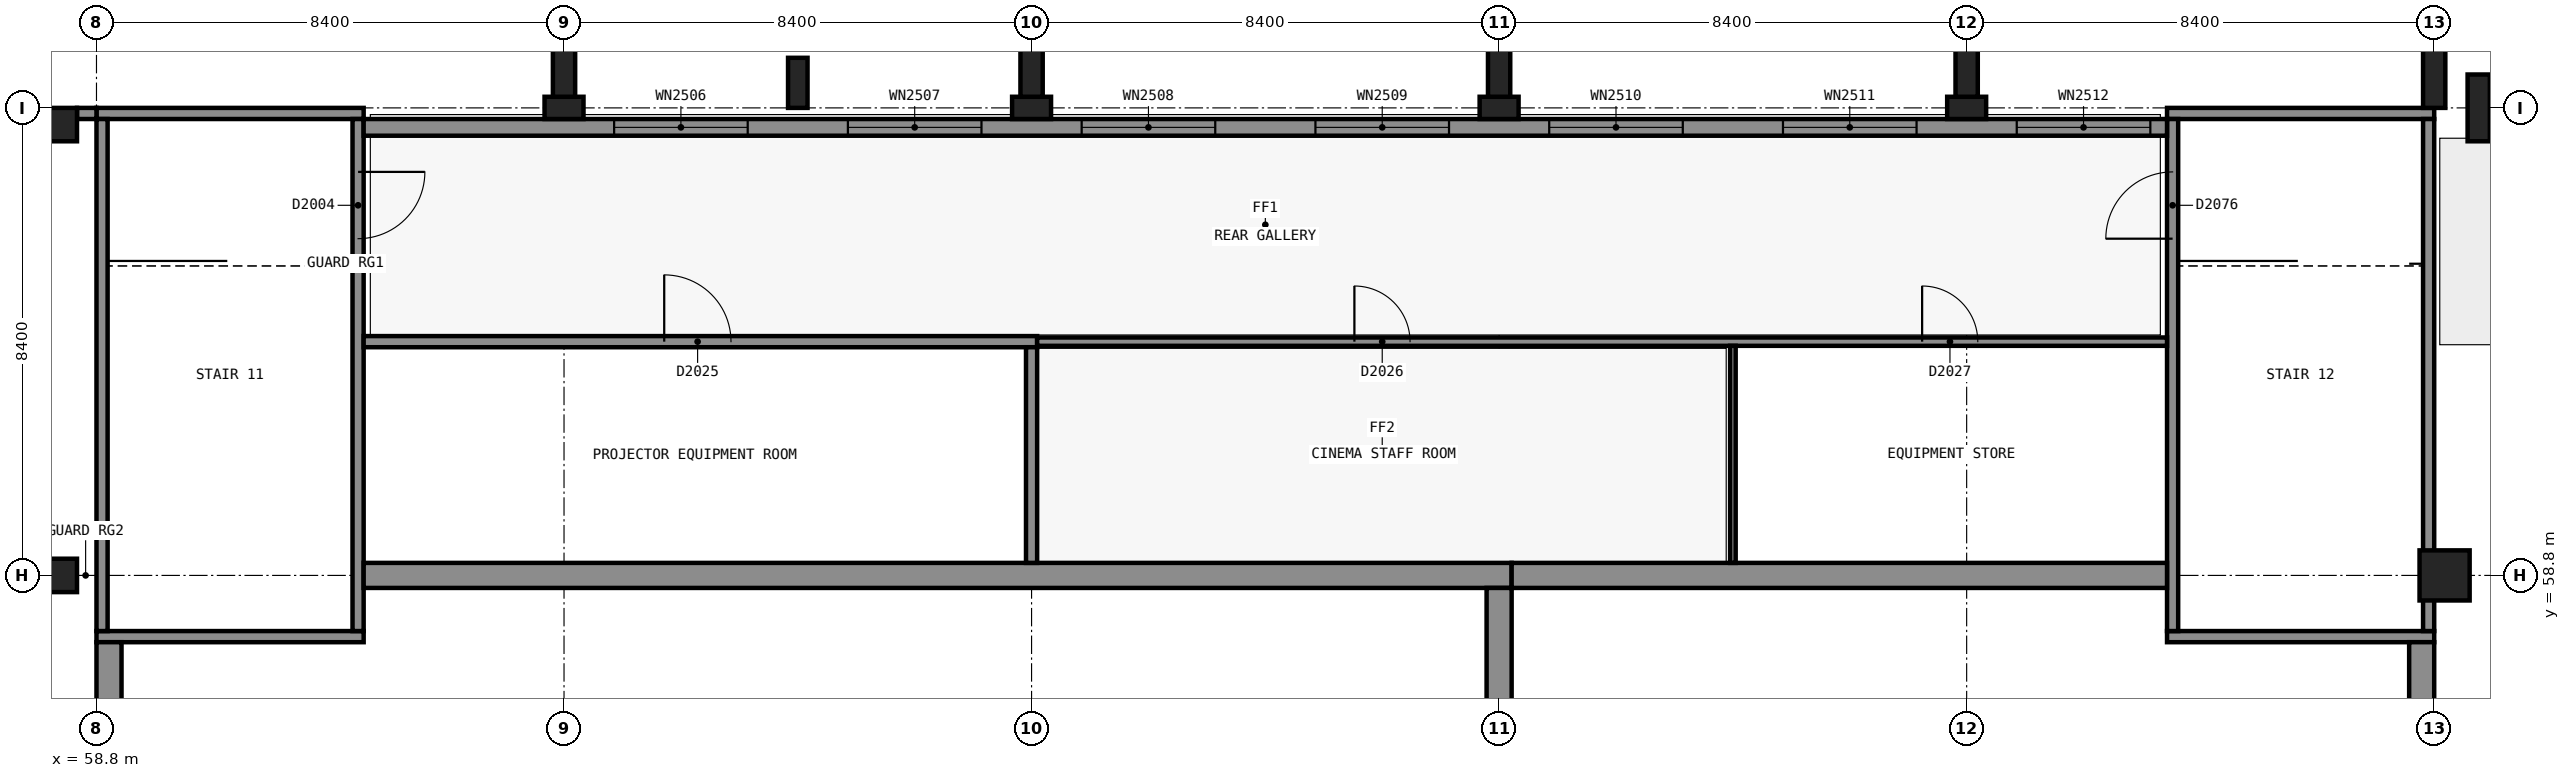
"""IFC4 building model, lengths in metres.
Left out: names, types, materials, properties, quantities, classifications, styles, units other than length and angle.
Written with IfcOpenShell. Run it as: python <this file> out.ifc"""

import sys

from ifc_helpers import new_model, si_unit, direction, frame, frame_2d, origin, origin_2d, place, context, subcontext, project, spatial, rectangle, extrude, element, fill, save


model = new_model("IFC4")
c1 = context("Model", 3, precision=1e-05, world=origin(), true_north=direction((0.0, 1.0)))
c2 = subcontext(c1, "Body", "Model", "MODEL_VIEW")
j1 = project(units=[si_unit("LENGTHUNIT", "METRE"), si_unit("PLANEANGLEUNIT", "RADIAN")], contexts=[c1])
p1 = place(None, origin())
s1 = spatial("IfcSite", under=j1, at=p1, CompositionType="ELEMENT")
p2 = place(p1, origin())
s2 = spatial("IfcBuilding", under=s1, at=p2, CompositionType="ELEMENT")
p3 = place(p2, frame((0.0, 0.0, 10.2)))
s3 = spatial("IfcBuildingStorey", under=s2, at=p3, CompositionType="ELEMENT", Elevation=10.2)
for number, where, z_axis, x_axis in (
    (1, (63.6, 57.7, 0.0), (0.0, 0.0, 1.0), (-1.0, 0.0, 0.0)),
    (2, (58.8, 67.1, 0.0), (0.0, 0.0, 1.0), (1.0, 0.0, 0.0)),
):
    element("IfcWall", number, at=place(p3, frame(where, z_axis=z_axis, x_axis=x_axis)), inside=s3, PredefinedType="SHEAR", context=c2, shape_type="SweptSolid", body=[
        extrude(rectangle(XDim=4.8, YDim=0.2, at=frame_2d((2.4, 0.0))), origin(), (0.0, 0.0, 1.0), 4.8),
    ])
p4 = place(p3, frame((58.9, 57.8, 0.0), z_axis=(0.0, 0.0, 1.0), x_axis=(0.0, 1.0, 0.0)))
e3 = element("IfcWall", 3, at=p4, inside=s3, PredefinedType="SHEAR", context=c2, shape_type="SweptSolid", body=[
    extrude(rectangle(XDim=9.2, YDim=0.2, at=frame_2d((4.6, 0.0))), origin(), (0.0, 0.0, 1.0), 4.8),
])
p5 = place(p3, frame((63.5, 67.0, 0.0), z_axis=(0.0, 0.0, 1.0), x_axis=(0.0, -1.0, 0.0)))
e4 = element("IfcWall", 4, at=p5, inside=s3, PredefinedType="SHEAR", context=c2, shape_type="SweptSolid", body=[
    extrude(rectangle(XDim=9.2, YDim=0.2, at=frame_2d((4.6, 0.0))), origin(), (0.0, 0.0, 1.0), 4.8),
])
p6 = place(p5, frame((0.95, 0.0, 0.0)))
e5 = element("IfcOpeningElement", 5, at=p6, cuts=e4, PredefinedType="OPENING", context=c2, shape_type="SweptSolid", body=[
    extrude(rectangle(XDim=1.2, YDim=2.1, at=frame_2d((0.6, 1.05))), frame((0.0, 0.11, 0.0), z_axis=(0.0, -1.0, 0.0), x_axis=(1.0, 0.0, 0.0)), (0.0, 0.0, 1.0), 0.22),
])
for number, where, z_axis, x_axis in (
    (6, (100.8, 57.7, 0.0), (0.0, 0.0, 1.0), (-1.0, 0.0, 0.0)),
    (7, (96.0, 67.1, 0.0), (0.0, 0.0, 1.0), (1.0, 0.0, 0.0)),
):
    element("IfcWall", number, at=place(p3, frame(where, z_axis=z_axis, x_axis=x_axis)), inside=s3, PredefinedType="SHEAR", context=c2, shape_type="SweptSolid", body=[
        extrude(rectangle(XDim=4.8, YDim=0.2, at=frame_2d((2.4, 0.0))), origin(), (0.0, 0.0, 1.0), 4.8),
    ])
p7 = place(p3, frame((96.1, 57.8, 0.0), z_axis=(0.0, 0.0, 1.0), x_axis=(0.0, 1.0, 0.0)))
e8 = element("IfcWall", 8, at=p7, inside=s3, PredefinedType="SHEAR", context=c2, shape_type="SweptSolid", body=[
    extrude(rectangle(XDim=9.2, YDim=0.2, at=frame_2d((4.6, 0.0))), origin(), (0.0, 0.0, 1.0), 4.8),
])
p8 = place(p7, frame((7.05, 0.0, 0.0)))
e9 = element("IfcOpeningElement", 9, at=p8, cuts=e8, PredefinedType="OPENING", context=c2, shape_type="SweptSolid", body=[
    extrude(rectangle(XDim=1.2, YDim=2.1, at=frame_2d((0.6, 1.05))), frame((0.0, 0.11, 0.0), z_axis=(0.0, -1.0, 0.0), x_axis=(1.0, 0.0, 0.0)), (0.0, 0.0, 1.0), 0.22),
])
p9 = place(p3, frame((100.7, 67.0, 0.0), z_axis=(0.0, 0.0, 1.0), x_axis=(0.0, -1.0, 0.0)))
e10 = element("IfcWall", 10, at=p9, inside=s3, PredefinedType="SHEAR", context=c2, shape_type="SweptSolid", body=[
    extrude(rectangle(XDim=9.2, YDim=0.2, at=frame_2d((4.6, 0.0))), origin(), (0.0, 0.0, 1.0), 4.8),
])
p10 = place(p3, frame((63.6, 58.8, 0.0), z_axis=(0.0, 0.0, 1.0), x_axis=(1.0, 0.0, 0.0)))
e11 = element("IfcWall", 11, at=p10, inside=s3, PredefinedType="SHEAR", context=c2, shape_type="SweptSolid", body=[
    extrude(rectangle(XDim=20.625, YDim=0.45, at=frame_2d((10.312, 0.0))), origin(), (0.0, 0.0, 1.0), 4.8),
])
p11 = place(p3, frame((59.025, 33.825, 0.0), z_axis=(0.0, 0.0, 1.0), x_axis=(0.0, 1.0, 0.0)))
e12 = element("IfcWall", 12, at=p11, inside=s3, PredefinedType="SHEAR", context=c2, shape_type="SweptSolid", body=[
    extrude(rectangle(XDim=23.775, YDim=0.45, at=frame_2d((11.888, 0.0))), origin(), (0.0, 0.0, 1.0), 4.8),
])
p12 = place(p3, frame((84.0, 58.575, 0.0), z_axis=(0.0, 0.0, 1.0), x_axis=(0.0, -1.0, 0.0)))
e13 = element("IfcWall", 13, at=p12, inside=s3, PredefinedType="SHEAR", context=c2, shape_type="SweptSolid", body=[
    extrude(rectangle(XDim=24.75, YDim=0.45, at=frame_2d((12.375, 0.0))), origin(), (0.0, 0.0, 1.0), 4.8),
])
p13 = place(p3, frame((84.225, 58.8, 0.0), z_axis=(0.0, 0.0, 1.0), x_axis=(1.0, 0.0, 0.0)))
e14 = element("IfcWall", 14, at=p13, inside=s3, PredefinedType="SHEAR", context=c2, shape_type="SweptSolid", body=[
    extrude(rectangle(XDim=11.775, YDim=0.45, at=frame_2d((5.887, 0.0))), origin(), (0.0, 0.0, 1.0), 4.8),
])
p14 = place(p3, frame((100.575, 57.6, 0.0), z_axis=(0.0, 0.0, 1.0), x_axis=(0.0, -1.0, 0.0)))
e15 = element("IfcWall", 15, at=p14, inside=s3, PredefinedType="SHEAR", context=c2, shape_type="SweptSolid", body=[
    extrude(rectangle(XDim=22.8, YDim=0.45, at=frame_2d((11.4, 0.0))), origin(), (0.0, 0.0, 1.0), 4.8),
])
for number, where, z_axis, x_axis in (
    (16, (67.2, 67.2, 0.0), (0.0, 0.0, 1.0), (1.0, 0.0, 0.0)),
    (17, (75.6, 67.2, 0.0), (0.0, 0.0, 1.0), (1.0, 0.0, 0.0)),
    (18, (84.0, 67.2, 0.0), (0.0, 0.0, 1.0), (1.0, 0.0, 0.0)),
    (19, (92.4, 67.2, 0.0), (0.0, 0.0, 1.0), (1.0, 0.0, 0.0)),
):
    element("IfcColumn", number, at=place(p3, frame(where, z_axis=z_axis, x_axis=x_axis)), inside=s3, PredefinedType="COLUMN", context=c2, shape_type="SweptSolid", body=[
        extrude(rectangle(XDim=0.7, YDim=0.4, at=origin_2d()), origin(), (0.0, 0.0, 1.0), 4.8),
    ])
for number, where, z_axis, x_axis in (
    (20, (58.15, 58.8, 0.0), (0.0, 0.0, 1.0), (1.0, 0.0, 0.0)),
    (21, (58.15, 66.9, 0.0), (0.0, 0.0, 1.0), (1.0, 0.0, 0.0)),
):
    element("IfcColumn", number, at=place(p3, frame(where, z_axis=z_axis, x_axis=x_axis)), inside=s3, PredefinedType="COLUMN", context=c2, shape_type="SweptSolid", body=[
        extrude(rectangle(XDim=0.6, YDim=0.6, at=origin_2d()), origin(), (0.0, 0.0, 1.0), 4.8),
    ])
p15 = place(p3, frame((100.987, 58.8, 3.8), z_axis=(0.0, 0.0, 1.0), x_axis=(1.0, 0.0, 0.0)))
e22 = element("IfcColumn", 22, at=p15, inside=s3, PredefinedType="COLUMN", context=c2, shape_type="SweptSolid", body=[
    extrude(rectangle(XDim=0.9, YDim=0.9, at=origin_2d()), origin(), (0.0, 0.0, 1.0), 1.0),
])
p16 = place(p3, frame((58.45, 67.1, 0.0), z_axis=(0.0, 0.0, 1.0), x_axis=(1.0, 0.0, 0.0)))
e23 = element("IfcWall", 23, at=p16, inside=s3, PredefinedType="SHEAR", context=c2, shape_type="SweptSolid", body=[
    extrude(rectangle(XDim=0.35, YDim=0.2, at=frame_2d((0.175, 0.0))), origin(), (0.0, 0.0, 1.0), 4.8),
])
p17 = place(p3, frame((101.6, 67.2, 0.0), z_axis=(0.0, 0.0, 1.0), x_axis=(0.0, 1.0, 0.0)))
e24 = element("IfcColumn", 24, at=p17, inside=s3, PredefinedType="PILASTER", context=c2, shape_type="SweptSolid", body=[
    extrude(rectangle(XDim=0.4, YDim=1.2, at=origin_2d()), origin(), (0.0, 0.0, 1.0), 4.8),
])
p18 = place(p3, frame((63.6, 66.85, 0.0), z_axis=(0.0, 0.0, 1.0), x_axis=(1.0, 0.0, 0.0)))
e25 = element("IfcWall", 25, at=p18, inside=s3, PredefinedType="SOLIDWALL", context=c2, shape_type="SweptSolid", body=[
    extrude(rectangle(XDim=32.4, YDim=0.3, at=frame_2d((16.2, 0.0))), origin(), (0.0, 0.0, 1.0), 4.2),
])
p19 = place(p18, frame((4.5, 0.0, 0.9)))
e26 = element("IfcOpeningElement", 26, at=p19, cuts=e25, PredefinedType="OPENING", context=c2, shape_type="SweptSolid", body=[
    extrude(rectangle(XDim=2.4, YDim=1.8, at=frame_2d((1.2, 0.9))), frame((0.0, 0.16, 0.0), z_axis=(0.0, -1.0, 0.0), x_axis=(1.0, 0.0, 0.0)), (0.0, 0.0, 1.0), 0.32),
])
p20 = place(p18, frame((8.7, 0.0, 0.9)))
e27 = element("IfcOpeningElement", 27, at=p20, cuts=e25, PredefinedType="OPENING", context=c2, shape_type="SweptSolid", body=[
    extrude(rectangle(XDim=2.4, YDim=1.8, at=frame_2d((1.2, 0.9))), frame((0.0, 0.16, 0.0), z_axis=(0.0, -1.0, 0.0), x_axis=(1.0, 0.0, 0.0)), (0.0, 0.0, 1.0), 0.32),
])
p21 = place(p18, frame((12.9, 0.0, 0.9)))
e28 = element("IfcOpeningElement", 28, at=p21, cuts=e25, PredefinedType="OPENING", context=c2, shape_type="SweptSolid", body=[
    extrude(rectangle(XDim=2.4, YDim=1.8, at=frame_2d((1.2, 0.9))), frame((0.0, 0.16, 0.0), z_axis=(0.0, -1.0, 0.0), x_axis=(1.0, 0.0, 0.0)), (0.0, 0.0, 1.0), 0.32),
])
p22 = place(p18, frame((17.1, 0.0, 0.9)))
e29 = element("IfcOpeningElement", 29, at=p22, cuts=e25, PredefinedType="OPENING", context=c2, shape_type="SweptSolid", body=[
    extrude(rectangle(XDim=2.4, YDim=1.8, at=frame_2d((1.2, 0.9))), frame((0.0, 0.16, 0.0), z_axis=(0.0, -1.0, 0.0), x_axis=(1.0, 0.0, 0.0)), (0.0, 0.0, 1.0), 0.32),
])
p23 = place(p18, frame((21.3, 0.0, 0.9)))
e30 = element("IfcOpeningElement", 30, at=p23, cuts=e25, PredefinedType="OPENING", context=c2, shape_type="SweptSolid", body=[
    extrude(rectangle(XDim=2.4, YDim=1.8, at=frame_2d((1.2, 0.9))), frame((0.0, 0.16, 0.0), z_axis=(0.0, -1.0, 0.0), x_axis=(1.0, 0.0, 0.0)), (0.0, 0.0, 1.0), 0.32),
])
p24 = place(p18, frame((25.5, 0.0, 0.9)))
e31 = element("IfcOpeningElement", 31, at=p24, cuts=e25, PredefinedType="OPENING", context=c2, shape_type="SweptSolid", body=[
    extrude(rectangle(XDim=2.4, YDim=1.8, at=frame_2d((1.2, 0.9))), frame((0.0, 0.16, 0.0), z_axis=(0.0, -1.0, 0.0), x_axis=(1.0, 0.0, 0.0)), (0.0, 0.0, 1.0), 0.32),
])
p25 = place(p18, frame((29.7, 0.0, 0.9)))
e32 = element("IfcOpeningElement", 32, at=p25, cuts=e25, PredefinedType="OPENING", context=c2, shape_type="SweptSolid", body=[
    extrude(rectangle(XDim=2.4, YDim=1.8, at=frame_2d((1.2, 0.9))), frame((0.0, 0.16, 0.0), z_axis=(0.0, -1.0, 0.0), x_axis=(1.0, 0.0, 0.0)), (0.0, 0.0, 1.0), 0.32),
])
p26 = place(p3, frame((67.2, 68.0, 0.0), z_axis=(0.0, 0.0, 1.0), x_axis=(1.0, 0.0, 0.0)))
e33 = element("IfcColumn", 33, at=p26, inside=s3, PredefinedType="PILASTER", context=c2, shape_type="SweptSolid", body=[
    extrude(rectangle(XDim=0.4, YDim=1.2, at=origin_2d()), origin(), (0.0, 0.0, 1.0), 4.8),
])
p27 = place(p3, frame((71.4, 67.65, 0.0), z_axis=(0.0, 0.0, 1.0), x_axis=(1.0, 0.0, 0.0)))
e34 = element("IfcColumn", 34, at=p27, inside=s3, PredefinedType="PILASTER", context=c2, shape_type="SweptSolid", body=[
    extrude(rectangle(XDim=0.35, YDim=0.9, at=origin_2d()), origin(), (0.0, 0.0, 1.0), 4.8),
])
for number, where, z_axis, x_axis in (
    (35, (75.6, 68.0, 0.0), (0.0, 0.0, 1.0), (1.0, 0.0, 0.0)),
    (36, (84.0, 68.0, 0.0), (0.0, 0.0, 1.0), (1.0, 0.0, 0.0)),
    (37, (92.4, 68.0, 0.0), (0.0, 0.0, 1.0), (1.0, 0.0, 0.0)),
    (38, (100.8, 67.8, 0.0), (0.0, 0.0, 1.0), (1.0, 0.0, 0.0)),
):
    element("IfcColumn", number, at=place(p3, frame(where, z_axis=z_axis, x_axis=x_axis)), inside=s3, PredefinedType="PILASTER", context=c2, shape_type="SweptSolid", body=[
        extrude(rectangle(XDim=0.4, YDim=1.2, at=origin_2d()), origin(), (0.0, 0.0, 1.0), 4.8),
    ])
p28 = place(p3, frame((63.6, 63.0, 0.0), z_axis=(0.0, 0.0, 1.0), x_axis=(1.0, 0.0, 0.0)))
e39 = element("IfcWall", 39, at=p28, inside=s3, PredefinedType="SOLIDWALL", context=c2, shape_type="SweptSolid", body=[
    extrude(rectangle(XDim=12.1, YDim=0.2, at=frame_2d((6.05, 0.0))), origin(), (0.0, 0.0, 1.0), 4.5),
])
p29 = place(p28, frame((5.4, 0.0, 0.0)))
e40 = element("IfcOpeningElement", 40, at=p29, cuts=e39, PredefinedType="OPENING", context=c2, shape_type="SweptSolid", body=[
    extrude(rectangle(XDim=1.2, YDim=2.1, at=frame_2d((0.6, 1.05))), frame((0.0, 0.11, 0.0), z_axis=(0.0, -1.0, 0.0), x_axis=(1.0, 0.0, 0.0)), (0.0, 0.0, 1.0), 0.22),
])
p30 = place(p3, frame((75.6, 59.025, 0.0), z_axis=(0.0, 0.0, 1.0), x_axis=(0.0, 1.0, 0.0)))
e41 = element("IfcWall", 41, at=p30, inside=s3, PredefinedType="SOLIDWALL", context=c2, shape_type="SweptSolid", body=[
    extrude(rectangle(XDim=3.875, YDim=0.2, at=frame_2d((1.938, 0.0))), origin(), (0.0, 0.0, 1.0), 4.5),
])
p31 = place(p3, frame((75.7, 63.0, 0.0), z_axis=(0.0, 0.0, 1.0), x_axis=(1.0, 0.0, 0.0)))
e42 = element("IfcWall", 42, at=p31, inside=s3, PredefinedType="PARTITIONING", context=c2, shape_type="SweptSolid", body=[
    extrude(rectangle(XDim=20.3, YDim=0.15, at=frame_2d((10.15, 0.0))), origin(), (0.0, 0.0, 1.0), 4.5),
])
p32 = place(p31, frame((5.7, 0.0, 0.0)))
e43 = element("IfcOpeningElement", 43, at=p32, cuts=e42, PredefinedType="OPENING", context=c2, shape_type="SweptSolid", body=[
    extrude(rectangle(XDim=1.0, YDim=2.1, at=frame_2d((0.5, 1.05))), frame((0.0, 0.085, 0.0), z_axis=(0.0, -1.0, 0.0), x_axis=(1.0, 0.0, 0.0)), (0.0, 0.0, 1.0), 0.17),
])
p33 = place(p31, frame((15.9, 0.0, 0.0)))
e44 = element("IfcOpeningElement", 44, at=p33, cuts=e42, PredefinedType="OPENING", context=c2, shape_type="SweptSolid", body=[
    extrude(rectangle(XDim=1.0, YDim=2.1, at=frame_2d((0.5, 1.05))), frame((0.0, 0.085, 0.0), z_axis=(0.0, -1.0, 0.0), x_axis=(1.0, 0.0, 0.0)), (0.0, 0.0, 1.0), 0.17),
])
p34 = place(p3, frame((88.2, 59.025, 0.0), z_axis=(0.0, 0.0, 1.0), x_axis=(0.0, 1.0, 0.0)))
e45 = element("IfcWall", 45, at=p34, inside=s3, PredefinedType="PARTITIONING", context=c2, shape_type="SweptSolid", body=[
    extrude(rectangle(XDim=3.9, YDim=0.1, at=frame_2d((1.95, 0.0))), origin(), (0.0, 0.0, 1.0), 4.5),
])
p35 = place(p19, origin())
e46 = element("IfcWindow", 46, at=p35, inside=s3, PartitioningType="SINGLE_PANEL", PredefinedType="WINDOW", context=c2, shape_type="SweptSolid", body=[
    extrude(rectangle(XDim=2.4, YDim=1.8, at=frame_2d((1.2, 0.9))), frame((0.0, 0.03, 0.0), z_axis=(0.0, -1.0, 0.0), x_axis=(1.0, 0.0, 0.0)), (0.0, 0.0, 1.0), 0.06),
])
fill(e26, e46)
p36 = place(p20, origin())
e47 = element("IfcWindow", 47, at=p36, inside=s3, PartitioningType="SINGLE_PANEL", PredefinedType="WINDOW", context=c2, shape_type="SweptSolid", body=[
    extrude(rectangle(XDim=2.4, YDim=1.8, at=frame_2d((1.2, 0.9))), frame((0.0, 0.03, 0.0), z_axis=(0.0, -1.0, 0.0), x_axis=(1.0, 0.0, 0.0)), (0.0, 0.0, 1.0), 0.06),
])
fill(e27, e47)
p37 = place(p21, origin())
e48 = element("IfcWindow", 48, at=p37, inside=s3, PartitioningType="SINGLE_PANEL", PredefinedType="WINDOW", context=c2, shape_type="SweptSolid", body=[
    extrude(rectangle(XDim=2.4, YDim=1.8, at=frame_2d((1.2, 0.9))), frame((0.0, 0.03, 0.0), z_axis=(0.0, -1.0, 0.0), x_axis=(1.0, 0.0, 0.0)), (0.0, 0.0, 1.0), 0.06),
])
fill(e28, e48)
p38 = place(p22, origin())
e49 = element("IfcWindow", 49, at=p38, inside=s3, PartitioningType="SINGLE_PANEL", PredefinedType="WINDOW", context=c2, shape_type="SweptSolid", body=[
    extrude(rectangle(XDim=2.4, YDim=1.8, at=frame_2d((1.2, 0.9))), frame((0.0, 0.03, 0.0), z_axis=(0.0, -1.0, 0.0), x_axis=(1.0, 0.0, 0.0)), (0.0, 0.0, 1.0), 0.06),
])
fill(e29, e49)
p39 = place(p23, origin())
e50 = element("IfcWindow", 50, at=p39, inside=s3, PartitioningType="SINGLE_PANEL", PredefinedType="WINDOW", context=c2, shape_type="SweptSolid", body=[
    extrude(rectangle(XDim=2.4, YDim=1.8, at=frame_2d((1.2, 0.9))), frame((0.0, 0.03, 0.0), z_axis=(0.0, -1.0, 0.0), x_axis=(1.0, 0.0, 0.0)), (0.0, 0.0, 1.0), 0.06),
])
fill(e30, e50)
p40 = place(p24, origin())
e51 = element("IfcWindow", 51, at=p40, inside=s3, PartitioningType="SINGLE_PANEL", PredefinedType="WINDOW", context=c2, shape_type="SweptSolid", body=[
    extrude(rectangle(XDim=2.4, YDim=1.8, at=frame_2d((1.2, 0.9))), frame((0.0, 0.03, 0.0), z_axis=(0.0, -1.0, 0.0), x_axis=(1.0, 0.0, 0.0)), (0.0, 0.0, 1.0), 0.06),
])
fill(e31, e51)
p41 = place(p25, origin())
e52 = element("IfcWindow", 52, at=p41, inside=s3, PartitioningType="SINGLE_PANEL", PredefinedType="WINDOW", context=c2, shape_type="SweptSolid", body=[
    extrude(rectangle(XDim=2.4, YDim=1.8, at=frame_2d((1.2, 0.9))), frame((0.0, 0.03, 0.0), z_axis=(0.0, -1.0, 0.0), x_axis=(1.0, 0.0, 0.0)), (0.0, 0.0, 1.0), 0.06),
])
fill(e32, e52)
p42 = place(p6, origin())
e53 = element("IfcDoor", 53, at=p42, inside=s3, OperationType="SINGLE_SWING_RIGHT", PredefinedType="DOOR", context=c2, shape_type="SweptSolid", body=[
    extrude(rectangle(XDim=1.2, YDim=2.1, at=frame_2d((0.6, 1.05))), frame((0.0, 0.025, 0.0), z_axis=(0.0, -1.0, 0.0), x_axis=(1.0, 0.0, 0.0)), (0.0, 0.0, 1.0), 0.05),
])
fill(e5, e53)
p43 = place(p29, origin())
e54 = element("IfcDoor", 54, at=p43, inside=s3, OperationType="SINGLE_SWING_LEFT", PredefinedType="DOOR", context=c2, shape_type="SweptSolid", body=[
    extrude(rectangle(XDim=1.2, YDim=2.1, at=frame_2d((0.6, 1.05))), frame((0.0, 0.025, 0.0), z_axis=(0.0, -1.0, 0.0), x_axis=(1.0, 0.0, 0.0)), (0.0, 0.0, 1.0), 0.05),
])
fill(e40, e54)
p44 = place(p32, origin())
e55 = element("IfcDoor", 55, at=p44, inside=s3, OperationType="SINGLE_SWING_RIGHT", PredefinedType="DOOR", context=c2, shape_type="SweptSolid", body=[
    extrude(rectangle(XDim=1.0, YDim=2.1, at=frame_2d((0.5, 1.05))), frame((0.0, 0.025, 0.0), z_axis=(0.0, -1.0, 0.0), x_axis=(1.0, 0.0, 0.0)), (0.0, 0.0, 1.0), 0.05),
])
fill(e43, e55)
p45 = place(p33, origin())
e56 = element("IfcDoor", 56, at=p45, inside=s3, OperationType="SINGLE_SWING_LEFT", PredefinedType="DOOR", context=c2, shape_type="SweptSolid", body=[
    extrude(rectangle(XDim=1.0, YDim=2.1, at=frame_2d((0.5, 1.05))), frame((0.0, 0.025, 0.0), z_axis=(0.0, -1.0, 0.0), x_axis=(1.0, 0.0, 0.0)), (0.0, 0.0, 1.0), 0.05),
])
fill(e44, e56)
p46 = place(p8, origin())
e57 = element("IfcDoor", 57, at=p46, inside=s3, OperationType="SINGLE_SWING_RIGHT", PredefinedType="DOOR", context=c2, shape_type="SweptSolid", body=[
    extrude(rectangle(XDim=1.2, YDim=2.1, at=frame_2d((0.6, 1.05))), frame((0.0, 0.025, 0.0), z_axis=(0.0, -1.0, 0.0), x_axis=(1.0, 0.0, 0.0)), (0.0, 0.0, 1.0), 0.05),
])
fill(e9, e57)
save(model, sys.argv[1])
